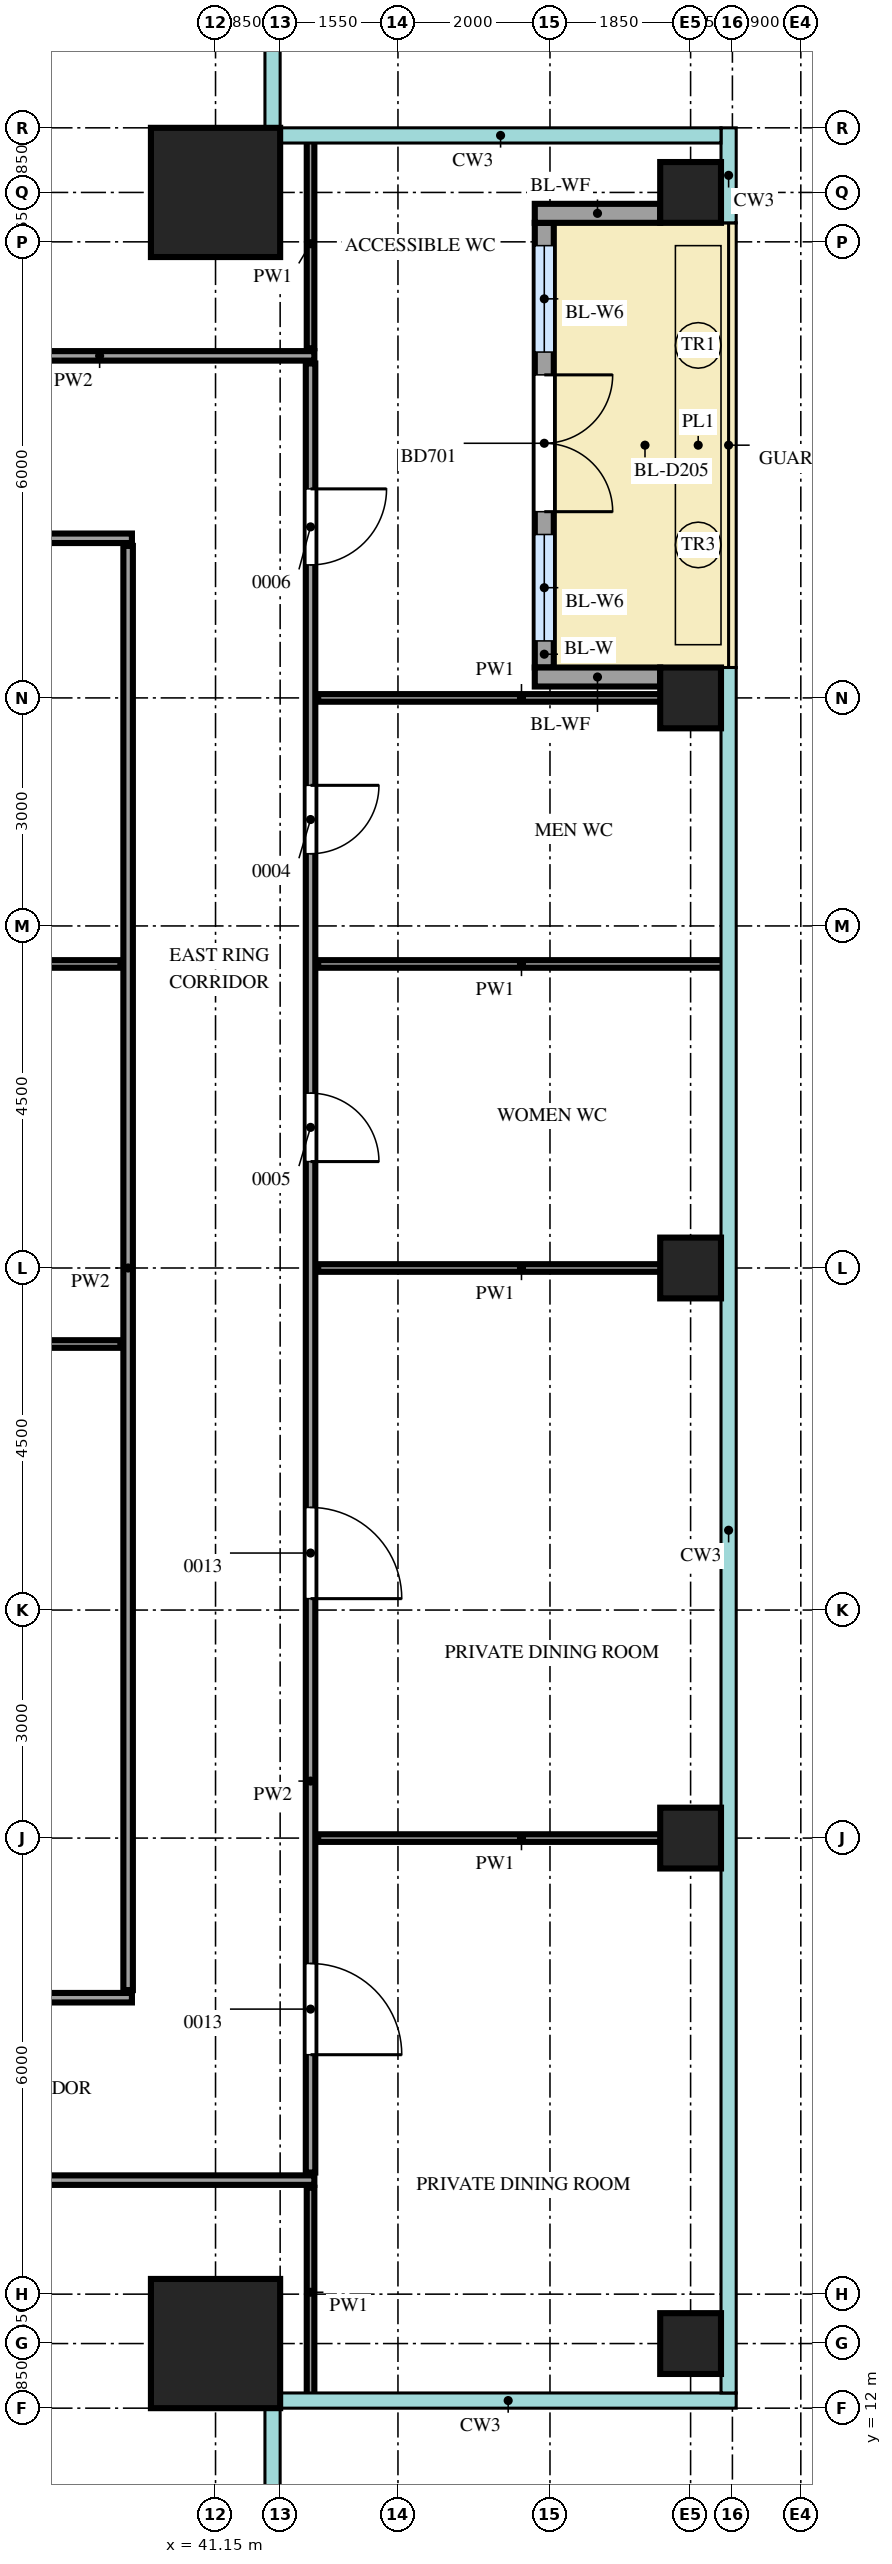
"""IFC4 building model, lengths in metres.
Left out: names, types, materials, properties, quantities, classifications, styles, units other than length and angle.
Written with IfcOpenShell. Run it as: python <this file> out.ifc"""

import sys

from ifc_helpers import new_model, si_unit, direction, frame, frame_2d, origin, origin_2d, place, context, subcontext, project, spatial, rectangle, extrude, source, transform, mapped, element, fill, save


model = new_model("IFC4")
c1 = context("Model", 3, precision=1e-05, world=origin(), true_north=direction((0.0, 1.0)))
c2 = subcontext(c1, "Body", "Model", "MODEL_VIEW")
j1 = project(units=[si_unit("LENGTHUNIT", "METRE"), si_unit("PLANEANGLEUNIT", "RADIAN")], contexts=[c1])
p1 = place(None, origin())
s1 = spatial("IfcSite", under=j1, at=p1, CompositionType="ELEMENT")
p2 = place(p1, origin())
s2 = spatial("IfcBuilding", under=s1, at=p2, CompositionType="ELEMENT")
p3 = place(p2, frame((0.0, 0.0, 310.2)))
s3 = spatial("IfcBuildingStorey", under=s2, at=p3, CompositionType="ELEMENT", Elevation=310.2)
m1 = source(origin(), c2, "Body", "SweptSolid", [
    extrude(rectangle(XDim=1.7, YDim=1.7, at=origin_2d()), origin(), (0.0, 0.0, 1.0), 3.75),
])
for number, where, z_axis, x_axis in (
    (1, (41.15, 41.15, 0.0), (0.0, 0.0, 1.0), (1.0, 0.0, 0.0)),
    (2, (41.15, 12.85, 0.0), (0.0, 0.0, 1.0), (1.0, 0.0, 0.0)),
):
    element("IfcColumn", number, at=place(p3, frame(where, z_axis=z_axis, x_axis=x_axis)), inside=s3, PredefinedType="COLUMN", context=c2, shape_type="MappedRepresentation", body=[
        mapped(m1, transform((0.0, 0.0, 0.0))),
    ])
m2 = source(origin(), c2, "Body", "SweptSolid", [
    extrude(rectangle(XDim=0.8, YDim=0.8, at=origin_2d()), origin(), (0.0, 0.0, 1.0), 3.75),
])
for number, where, z_axis, x_axis in (
    (3, (47.4, 12.85, 0.0), (0.0, 0.0, 1.0), (1.0, 0.0, 0.0)),
    (4, (47.4, 19.5, 0.0), (0.0, 0.0, 1.0), (1.0, 0.0, 0.0)),
    (5, (47.4, 27.0, 0.0), (0.0, 0.0, 1.0), (1.0, 0.0, 0.0)),
    (6, (47.4, 34.5, 0.0), (0.0, 0.0, 1.0), (1.0, 0.0, 0.0)),
    (7, (47.4, 41.15, 0.0), (0.0, 0.0, 1.0), (1.0, 0.0, 0.0)),
):
    element("IfcColumn", number, at=place(p3, frame(where, z_axis=z_axis, x_axis=x_axis)), inside=s3, PredefinedType="COLUMN", context=c2, shape_type="MappedRepresentation", body=[
        mapped(m2, transform((0.0, 0.0, 0.0))),
    ])
m3 = source(origin(), c2, "Body", "SweptSolid", [
    extrude(rectangle(XDim=5.85, YDim=0.25, at=frame_2d((2.925, 0.0))), origin(), (0.0, 0.0, 1.0), 3.75),
])
p4 = place(p3, frame((45.475, 34.9, 0.0), z_axis=(0.0, 0.0, 1.0), x_axis=(0.0, 1.0, 0.0)))
e8 = element("IfcWall", 8, at=p4, inside=s3, PredefinedType="SOLIDWALL", context=c2, shape_type="MappedRepresentation", body=[
    mapped(m3, transform((0.0, 0.0, 0.0))),
])
m4 = source(origin(), c2, "Body", "SweptSolid", [
    extrude(rectangle(XDim=1.4, YDim=2.4, at=frame_2d((0.7, 1.2))), frame((0.0, 0.135, 0.0), z_axis=(0.0, -1.0, 0.0), x_axis=(1.0, 0.0, 0.0)), (0.0, 0.0, 1.0), 0.27),
])
p5 = place(p4, frame((0.35, 0.0, 0.0)))
e9 = element("IfcOpeningElement", 9, at=p5, cuts=e8, PredefinedType="OPENING", context=c2, shape_type="MappedRepresentation", body=[
    mapped(m4, transform((0.0, 0.0, 0.0))),
])
p6 = place(p4, frame((4.15, 0.0, 0.0)))
e10 = element("IfcOpeningElement", 10, at=p6, cuts=e8, PredefinedType="OPENING", context=c2, shape_type="MappedRepresentation", body=[
    mapped(m4, transform((0.0, 0.0, 0.0))),
])
m5 = source(origin(), c2, "Body", "SweptSolid", [
    extrude(rectangle(XDim=1.8, YDim=2.4, at=frame_2d((0.9, 1.2))), frame((0.0, 0.135, 0.0), z_axis=(0.0, -1.0, 0.0), x_axis=(1.0, 0.0, 0.0)), (0.0, 0.0, 1.0), 0.27),
])
p7 = place(p4, frame((2.05, 0.0, 0.0)))
e11 = element("IfcOpeningElement", 11, at=p7, cuts=e8, PredefinedType="OPENING", context=c2, shape_type="MappedRepresentation", body=[
    mapped(m5, transform((0.0, 0.0, 0.0))),
])
m6 = source(origin(), c2, "Body", "SweptSolid", [
    extrude(rectangle(XDim=1.65, YDim=0.25, at=frame_2d((0.825, 0.0))), origin(), (0.0, 0.0, 1.0), 3.45),
])
for number, where, z_axis, x_axis in (
    (12, (47.0, 34.775, 0.0), (0.0, 0.0, 1.0), (-1.0, 0.0, 0.0)),
    (13, (47.0, 40.875, 0.0), (0.0, 0.0, 1.0), (-1.0, 0.0, 0.0)),
):
    element("IfcWall", number, at=place(p3, frame(where, z_axis=z_axis, x_axis=x_axis)), inside=s3, PredefinedType="SOLIDWALL", context=c2, shape_type="MappedRepresentation", body=[
        mapped(m6, transform((0.0, 0.0, 0.0))),
    ])
m7 = source(origin(), c2, "Body", "SweptSolid", [
    extrude(rectangle(XDim=2.75, YDim=0.1, at=frame_2d((1.375, 0.0))), origin(), (0.0, 0.0, 1.0), 3.8),
])
p8 = place(p3, frame((42.4, 12.15, 0.0), z_axis=(0.0, 0.0, 1.0), x_axis=(0.0, 1.0, 0.0)))
e14 = element("IfcWall", 14, at=p8, inside=s3, PredefinedType="PARTITIONING", context=c2, shape_type="MappedRepresentation", body=[
    mapped(m7, transform((0.0, 0.0, 0.0))),
])
m8 = source(origin(), c2, "Body", "SweptSolid", [
    extrude(rectangle(XDim=19.1, YDim=0.125, at=frame_2d((9.55, 0.0))), origin(), (0.0, 0.0, 1.0), 3.8),
])
p9 = place(p3, frame((23.35, 15.0, 0.0), z_axis=(0.0, 0.0, 1.0), x_axis=(1.0, 0.0, 0.0)))
e15 = element("IfcWall", 15, at=p9, inside=s3, PredefinedType="PARTITIONING", context=c2, shape_type="MappedRepresentation", body=[
    mapped(m8, transform((0.0, 0.0, 0.0))),
])
m9 = source(origin(), c2, "Body", "SweptSolid", [
    extrude(rectangle(XDim=1.2, YDim=2.1, at=frame_2d((0.6, 1.05))), frame((0.0, 0.073, 0.0), z_axis=(0.0, -1.0, 0.0), x_axis=(1.0, 0.0, 0.0)), (0.0, 0.0, 1.0), 0.145),
])
p10 = place(p9, frame((7.75, 0.0, 0.0)))
e16 = element("IfcOpeningElement", 16, at=p10, cuts=e15, PredefinedType="OPENING", context=c2, shape_type="MappedRepresentation", body=[
    mapped(m9, transform((0.0, 0.0, 0.0))),
])
m10 = source(origin(), c2, "Body", "SweptSolid", [
    extrude(rectangle(XDim=23.8, YDim=0.125, at=frame_2d((11.9, 0.0))), origin(), (0.0, 0.0, 1.0), 3.8),
])
p11 = place(p3, frame((42.4, 15.1, 0.0), z_axis=(0.0, 0.0, 1.0), x_axis=(0.0, 1.0, 0.0)))
e17 = element("IfcWall", 17, at=p11, inside=s3, PredefinedType="PARTITIONING", context=c2, shape_type="MappedRepresentation", body=[
    mapped(m10, transform((0.0, 0.0, 0.0))),
])
p12 = place(p11, frame((1.55, 0.0, 0.0)))
e18 = element("IfcOpeningElement", 18, at=p12, cuts=e17, PredefinedType="OPENING", context=c2, shape_type="MappedRepresentation", body=[
    mapped(m9, transform((0.0, 0.0, 0.0))),
])
p13 = place(p11, frame((7.55, 0.0, 0.0)))
e19 = element("IfcOpeningElement", 19, at=p13, cuts=e17, PredefinedType="OPENING", context=c2, shape_type="MappedRepresentation", body=[
    mapped(m9, transform((0.0, 0.0, 0.0))),
])
m11 = source(origin(), c2, "Body", "SweptSolid", [
    extrude(rectangle(XDim=0.9, YDim=2.1, at=frame_2d((0.45, 1.05))), frame((0.0, 0.073, 0.0), z_axis=(0.0, -1.0, 0.0), x_axis=(1.0, 0.0, 0.0)), (0.0, 0.0, 1.0), 0.145),
])
p14 = place(p11, frame((13.3, 0.0, 0.0)))
e20 = element("IfcOpeningElement", 20, at=p14, cuts=e17, PredefinedType="OPENING", context=c2, shape_type="MappedRepresentation", body=[
    mapped(m11, transform((0.0, 0.0, 0.0))),
])
p15 = place(p11, frame((17.35, 0.0, 0.0)))
e21 = element("IfcOpeningElement", 21, at=p15, cuts=e17, PredefinedType="OPENING", context=c2, shape_type="MappedRepresentation", body=[
    mapped(m11, transform((0.0, 0.0, 0.0))),
])
m12 = source(origin(), c2, "Body", "SweptSolid", [
    extrude(rectangle(XDim=1.0, YDim=2.1, at=frame_2d((0.5, 1.05))), frame((0.0, 0.073, 0.0), z_axis=(0.0, -1.0, 0.0), x_axis=(1.0, 0.0, 0.0)), (0.0, 0.0, 1.0), 0.145),
])
p16 = place(p11, frame((21.15, 0.0, 0.0)))
e22 = element("IfcOpeningElement", 22, at=p16, cuts=e17, PredefinedType="OPENING", context=c2, shape_type="MappedRepresentation", body=[
    mapped(m12, transform((0.0, 0.0, 0.0))),
])
m13 = source(origin(), c2, "Body", "SweptSolid", [
    extrude(rectangle(XDim=16.7, YDim=0.125, at=frame_2d((8.35, 0.0))), origin(), (0.0, 0.0, 1.0), 3.8),
])
p17 = place(p3, frame((23.35, 17.4, 0.0), z_axis=(0.0, 0.0, 1.0), x_axis=(1.0, 0.0, 0.0)))
e23 = element("IfcWall", 23, at=p17, inside=s3, PredefinedType="PARTITIONING", context=c2, shape_type="MappedRepresentation", body=[
    mapped(m13, transform((0.0, 0.0, 0.0))),
])
p18 = place(p17, frame((7.75, 0.0, 0.0)))
e24 = element("IfcOpeningElement", 24, at=p18, cuts=e23, PredefinedType="OPENING", context=c2, shape_type="MappedRepresentation", body=[
    mapped(m9, transform((0.0, 0.0, 0.0))),
])
m14 = source(origin(), c2, "Body", "SweptSolid", [
    extrude(rectangle(XDim=19.0, YDim=0.125, at=frame_2d((9.5, 0.0))), origin(), (0.0, 0.0, 1.0), 3.8),
])
p19 = place(p3, frame((40.0, 17.5, 0.0), z_axis=(0.0, 0.0, 1.0), x_axis=(0.0, 1.0, 0.0)))
e25 = element("IfcWall", 25, at=p19, inside=s3, PredefinedType="PARTITIONING", context=c2, shape_type="MappedRepresentation", body=[
    mapped(m14, transform((0.0, 0.0, 0.0))),
])
m15 = source(origin(), c2, "Body", "SweptSolid", [
    extrude(rectangle(XDim=5.35, YDim=0.1, at=frame_2d((2.675, 0.0))), origin(), (0.0, 0.0, 1.0), 3.8),
])
p20 = place(p3, frame((42.5, 19.5, 0.0), z_axis=(0.0, 0.0, 1.0), x_axis=(1.0, 0.0, 0.0)))
e26 = element("IfcWall", 26, at=p20, inside=s3, PredefinedType="PARTITIONING", context=c2, shape_type="MappedRepresentation", body=[
    mapped(m15, transform((0.0, 0.0, 0.0))),
])
m16 = source(origin(), c2, "Body", "SweptSolid", [
    extrude(rectangle(XDim=16.4, YDim=0.1, at=frame_2d((8.2, 0.0))), origin(), (0.0, 0.0, 1.0), 3.8),
])
p21 = place(p3, frame((23.5, 26.0, 0.0), z_axis=(0.0, 0.0, 1.0), x_axis=(1.0, 0.0, 0.0)))
e27 = element("IfcWall", 27, at=p21, inside=s3, PredefinedType="PARTITIONING", context=c2, shape_type="MappedRepresentation", body=[
    mapped(m16, transform((0.0, 0.0, 0.0))),
])
p22 = place(p3, frame((42.5, 27.0, 0.0), z_axis=(0.0, 0.0, 1.0), x_axis=(1.0, 0.0, 0.0)))
e28 = element("IfcWall", 28, at=p22, inside=s3, PredefinedType="PARTITIONING", context=c2, shape_type="MappedRepresentation", body=[
    mapped(m15, transform((0.0, 0.0, 0.0))),
])
p23 = place(p3, frame((23.5, 31.0, 0.0), z_axis=(0.0, 0.0, 1.0), x_axis=(1.0, 0.0, 0.0)))
e29 = element("IfcWall", 29, at=p23, inside=s3, PredefinedType="PARTITIONING", context=c2, shape_type="MappedRepresentation", body=[
    mapped(m16, transform((0.0, 0.0, 0.0))),
])
for number, where, z_axis, x_axis in (
    (30, (42.5, 31.0, 0.0), (0.0, 0.0, 1.0), (1.0, 0.0, 0.0)),
    (31, (42.5, 34.5, 0.0), (0.0, 0.0, 1.0), (1.0, 0.0, 0.0)),
):
    element("IfcWall", number, at=place(p3, frame(where, z_axis=z_axis, x_axis=x_axis)), inside=s3, PredefinedType="PARTITIONING", context=c2, shape_type="MappedRepresentation", body=[
        mapped(m15, transform((0.0, 0.0, 0.0))),
    ])
p24 = place(p3, frame((23.35, 36.6, 0.0), z_axis=(0.0, 0.0, 1.0), x_axis=(1.0, 0.0, 0.0)))
e32 = element("IfcWall", 32, at=p24, inside=s3, PredefinedType="PARTITIONING", context=c2, shape_type="MappedRepresentation", body=[
    mapped(m13, transform((0.0, 0.0, 0.0))),
])
p25 = place(p24, frame((8.05, 0.0, 0.0)))
e33 = element("IfcOpeningElement", 33, at=p25, cuts=e32, PredefinedType="OPENING", context=c2, shape_type="MappedRepresentation", body=[
    mapped(m11, transform((0.0, 0.0, 0.0))),
])
m17 = source(origin(), c2, "Body", "SweptSolid", [
    extrude(rectangle(XDim=12.1, YDim=0.125, at=frame_2d((6.05, 0.0))), origin(), (0.0, 0.0, 1.0), 3.8),
])
p26 = place(p3, frame((30.35, 39.0, 0.0), z_axis=(0.0, 0.0, 1.0), x_axis=(1.0, 0.0, 0.0)))
e34 = element("IfcWall", 34, at=p26, inside=s3, PredefinedType="PARTITIONING", context=c2, shape_type="MappedRepresentation", body=[
    mapped(m17, transform((0.0, 0.0, 0.0))),
])
p27 = place(p26, frame((5.25, 0.0, 0.0)))
e35 = element("IfcOpeningElement", 35, at=p27, cuts=e34, PredefinedType="OPENING", context=c2, shape_type="MappedRepresentation", body=[
    mapped(m9, transform((0.0, 0.0, 0.0))),
])
p28 = place(p3, frame((42.4, 39.1, 0.0), z_axis=(0.0, 0.0, 1.0), x_axis=(0.0, 1.0, 0.0)))
e36 = element("IfcWall", 36, at=p28, inside=s3, PredefinedType="PARTITIONING", context=c2, shape_type="MappedRepresentation", body=[
    mapped(m7, transform((0.0, 0.0, 0.0))),
])
m18 = source(origin(), c2, "Body", "SweptSolid", [
    extrude(rectangle(XDim=1.4, YDim=2.4, at=frame_2d((0.7, 1.2))), frame((0.0, 0.03, 0.0), z_axis=(0.0, -1.0, 0.0), x_axis=(1.0, 0.0, 0.0)), (0.0, 0.0, 1.0), 0.06),
])
p29 = place(p5, origin())
e37 = element("IfcWindow", 37, at=p29, inside=s3, PartitioningType="SINGLE_PANEL", PredefinedType="WINDOW", context=c2, shape_type="MappedRepresentation", body=[
    mapped(m18, transform((0.0, 0.0, 0.0))),
])
fill(e9, e37)
p30 = place(p6, origin())
e38 = element("IfcWindow", 38, at=p30, inside=s3, PartitioningType="SINGLE_PANEL", PredefinedType="WINDOW", context=c2, shape_type="MappedRepresentation", body=[
    mapped(m18, transform((0.0, 0.0, 0.0))),
])
fill(e10, e38)
m19 = source(origin(), c2, "Body", "SweptSolid", [
    extrude(rectangle(XDim=1.8, YDim=2.4, at=frame_2d((0.9, 1.2))), frame((0.0, 0.025, 0.0), z_axis=(0.0, -1.0, 0.0), x_axis=(1.0, 0.0, 0.0)), (0.0, 0.0, 1.0), 0.05),
])
p31 = place(p7, origin())
e39 = element("IfcDoor", 39, at=p31, inside=s3, OperationType="DOUBLE_DOOR_DOUBLE_SWING", PredefinedType="DOOR", context=c2, shape_type="MappedRepresentation", body=[
    mapped(m19, transform((0.0, 0.0, 0.0))),
])
fill(e11, e39)
m20 = source(origin(), c2, "Body", "SweptSolid", [
    extrude(rectangle(XDim=1.2, YDim=2.1, at=frame_2d((0.6, 1.05))), frame((0.0, 0.025, 0.0), z_axis=(0.0, -1.0, 0.0), x_axis=(1.0, 0.0, 0.0)), (0.0, 0.0, 1.0), 0.05),
])
p32 = place(p12, origin())
e40 = element("IfcDoor", 40, at=p32, inside=s3, OperationType="SINGLE_SWING_LEFT", PredefinedType="DOOR", context=c2, shape_type="MappedRepresentation", body=[
    mapped(m20, transform((0.0, 0.0, 0.0))),
])
fill(e18, e40)
p33 = place(p13, origin())
e41 = element("IfcDoor", 41, at=p33, inside=s3, OperationType="SINGLE_SWING_LEFT", PredefinedType="DOOR", context=c2, shape_type="MappedRepresentation", body=[
    mapped(m20, transform((0.0, 0.0, 0.0))),
])
fill(e19, e41)
m21 = source(origin(), c2, "Body", "SweptSolid", [
    extrude(rectangle(XDim=0.9, YDim=2.1, at=frame_2d((0.45, 1.05))), frame((0.0, 0.025, 0.0), z_axis=(0.0, -1.0, 0.0), x_axis=(1.0, 0.0, 0.0)), (0.0, 0.0, 1.0), 0.05),
])
p34 = place(p14, origin())
e42 = element("IfcDoor", 42, at=p34, inside=s3, OperationType="SINGLE_SWING_LEFT", PredefinedType="DOOR", context=c2, shape_type="MappedRepresentation", body=[
    mapped(m21, transform((0.0, 0.0, 0.0))),
])
fill(e20, e42)
p35 = place(p15, origin())
e43 = element("IfcDoor", 43, at=p35, inside=s3, OperationType="SINGLE_SWING_RIGHT", PredefinedType="DOOR", context=c2, shape_type="MappedRepresentation", body=[
    mapped(m21, transform((0.0, 0.0, 0.0))),
])
fill(e21, e43)
m22 = source(origin(), c2, "Body", "SweptSolid", [
    extrude(rectangle(XDim=1.0, YDim=2.1, at=frame_2d((0.5, 1.05))), frame((0.0, 0.025, 0.0), z_axis=(0.0, -1.0, 0.0), x_axis=(1.0, 0.0, 0.0)), (0.0, 0.0, 1.0), 0.05),
])
p36 = place(p16, origin())
e44 = element("IfcDoor", 44, at=p36, inside=s3, OperationType="SINGLE_SWING_RIGHT", PredefinedType="DOOR", context=c2, shape_type="MappedRepresentation", body=[
    mapped(m22, transform((0.0, 0.0, 0.0))),
])
fill(e22, e44)
save(model, sys.argv[1])
